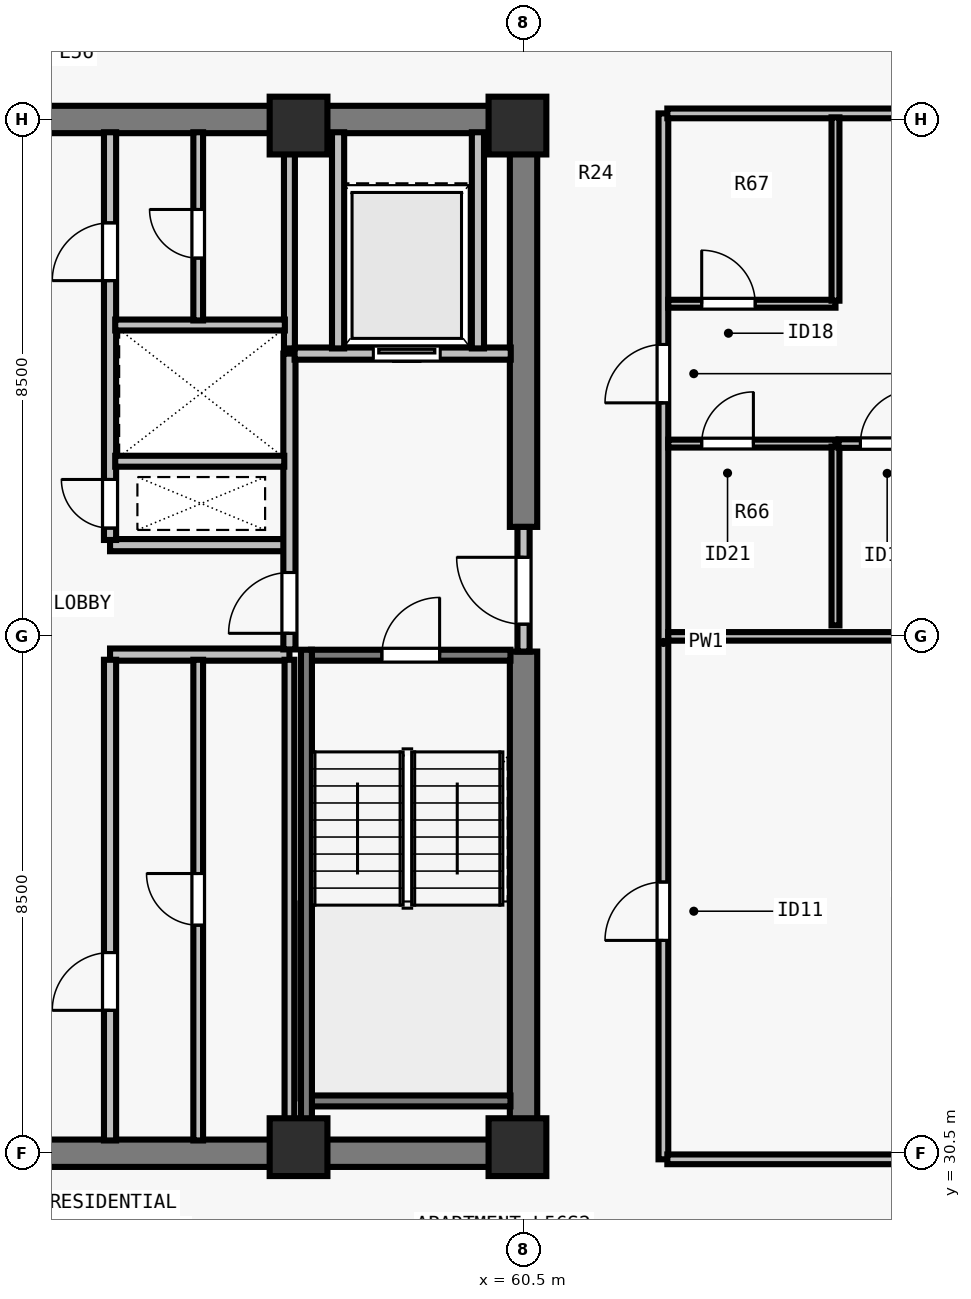
"""IFC4 building model, lengths in metres.
Left out: names, types, materials, properties, quantities, classifications, styles, units other than length and angle.
Written with IfcOpenShell. Run it as: python <this file> out.ifc"""

import sys

from ifc_helpers import new_model, si_unit, direction, frame, frame_2d, origin, origin_2d, place, context, subcontext, project, spatial, rectangle, extrude, element, fill, save


model = new_model("IFC4")
c1 = context("Model", 3, precision=1e-05, world=origin(), true_north=direction((0.0, 1.0)))
c2 = subcontext(c1, "Body", "Model", "MODEL_VIEW")
j1 = project(units=[si_unit("LENGTHUNIT", "METRE"), si_unit("PLANEANGLEUNIT", "RADIAN")], contexts=[c1])
p1 = place(None, origin())
s1 = spatial("IfcSite", under=j1, at=p1, CompositionType="ELEMENT")
p2 = place(p1, origin())
s2 = spatial("IfcBuilding", under=s1, at=p2, CompositionType="ELEMENT")
p3 = place(p2, frame((0.0, 0.0, 206.0)))
s3 = spatial("IfcBuildingStorey", under=s2, at=p3, CompositionType="ELEMENT", Elevation=206.0)
for number, where, z_axis, x_axis in (
    (1, (56.8, 30.6, 0.0), (0.0, 0.0, 1.0), (1.0, 0.0, 0.0)),
    (2, (60.4, 30.6, 0.0), (0.0, 0.0, 1.0), (1.0, 0.0, 0.0)),
    (3, (56.8, 47.4, 0.0), (0.0, 0.0, 1.0), (1.0, 0.0, 0.0)),
    (4, (60.4, 47.4, 0.0), (0.0, 0.0, 1.0), (1.0, 0.0, 0.0)),
):
    element("IfcColumn", number, at=place(p3, frame(where, z_axis=z_axis, x_axis=x_axis)), inside=s3, PredefinedType="COLUMN", context=c2, shape_type="SweptSolid", body=[
        extrude(rectangle(XDim=0.95, YDim=0.95, at=origin_2d()), origin(), (0.0, 0.0, 1.0), 3.5),
    ])
for number, where, z_axis, x_axis in (
    (5, (43.275, 30.5, 0.0), (0.0, 0.0, 1.0), (1.0, 0.0, 0.0)),
    (6, (43.275, 47.5, 0.0), (0.0, 0.0, 1.0), (1.0, 0.0, 0.0)),
):
    element("IfcWall", number, at=place(p3, frame(where, z_axis=z_axis, x_axis=x_axis)), inside=s3, PredefinedType="SHEAR", context=c2, shape_type="SweptSolid", body=[
        extrude(rectangle(XDim=17.45, YDim=0.45, at=frame_2d((8.725, 0.0))), origin(), (0.0, 0.0, 1.0), 3.29),
    ])
p4 = place(p3, frame((60.5, 30.715, 0.0), z_axis=(0.0, 0.0, 1.0), x_axis=(0.0, 1.0, 0.0)))
e7 = element("IfcWall", 7, at=p4, inside=s3, PredefinedType="SHEAR", context=c2, shape_type="SweptSolid", body=[
    extrude(rectangle(XDim=8.035, YDim=0.45, at=frame_2d((4.018, 0.0))), origin(), (0.0, 0.0, 1.0), 3.29),
])
p5 = place(p3, frame((60.5, 40.8, 0.0), z_axis=(0.0, 0.0, 1.0), x_axis=(0.0, 1.0, 0.0)))
e8 = element("IfcWall", 8, at=p5, inside=s3, PredefinedType="SHEAR", context=c2, shape_type="SweptSolid", body=[
    extrude(rectangle(XDim=6.485, YDim=0.45, at=frame_2d((3.242, 0.0))), origin(), (0.0, 0.0, 1.0), 3.29),
])
for number, where, z_axis, x_axis in (
    (9, (53.7, 38.7, 0.0), (0.0, 0.0, 1.0), (1.0, 0.0, 0.0)),
    (10, (53.7, 40.5, 0.0), (0.0, 0.0, 1.0), (1.0, 0.0, 0.0)),
):
    element("IfcWall", number, at=place(p3, frame(where, z_axis=z_axis, x_axis=x_axis)), inside=s3, PredefinedType="SOLIDWALL", context=c2, shape_type="SweptSolid", body=[
        extrude(rectangle(XDim=2.95, YDim=0.2, at=frame_2d((1.475, 0.0))), origin(), (0.0, 0.0, 1.0), 3.29),
    ])
p6 = place(p3, frame((53.7, 30.71, 0.0), z_axis=(0.0, 0.0, 1.0), x_axis=(0.0, 1.0, 0.0)))
e11 = element("IfcWall", 11, at=p6, inside=s3, PredefinedType="SOLIDWALL", context=c2, shape_type="SweptSolid", body=[
    extrude(rectangle(XDim=7.905, YDim=0.2, at=frame_2d((3.953, 0.0))), origin(), (0.0, 0.0, 1.0), 3.29),
])
p7 = place(p6, frame((2.14, 0.0, 0.0)))
e12 = element("IfcOpeningElement", 12, at=p7, cuts=e11, PredefinedType="OPENING", context=c2, shape_type="SweptSolid", body=[
    extrude(rectangle(XDim=0.95, YDim=2.12, at=frame_2d((0.475, 1.06))), frame((0.0, 0.11, 0.0), z_axis=(0.0, -1.0, 0.0), x_axis=(1.0, 0.0, 0.0)), (0.0, 0.0, 1.0), 0.22),
])
p8 = place(p3, frame((53.7, 40.585, 0.0), z_axis=(0.0, 0.0, 1.0), x_axis=(0.0, 1.0, 0.0)))
e13 = element("IfcWall", 13, at=p8, inside=s3, PredefinedType="SOLIDWALL", context=c2, shape_type="SweptSolid", body=[
    extrude(rectangle(XDim=6.705, YDim=0.2, at=frame_2d((3.353, 0.0))), origin(), (0.0, 0.0, 1.0), 3.29),
])
p9 = place(p8, frame((0.195, 0.0, 0.0)))
e14 = element("IfcOpeningElement", 14, at=p9, cuts=e13, PredefinedType="OPENING", context=c2, shape_type="SweptSolid", body=[
    extrude(rectangle(XDim=0.8, YDim=2.08, at=frame_2d((0.4, 1.04))), frame((0.0, 0.11, 0.0), z_axis=(0.0, -1.0, 0.0), x_axis=(1.0, 0.0, 0.0)), (0.0, 0.0, 1.0), 0.22),
])
p10 = place(p8, frame((4.265, 0.0, 0.0)))
e15 = element("IfcOpeningElement", 15, at=p10, cuts=e13, PredefinedType="OPENING", context=c2, shape_type="SweptSolid", body=[
    extrude(rectangle(XDim=0.95, YDim=2.12, at=frame_2d((0.475, 1.06))), frame((0.0, 0.11, 0.0), z_axis=(0.0, -1.0, 0.0), x_axis=(1.0, 0.0, 0.0)), (0.0, 0.0, 1.0), 0.22),
])
p11 = place(p3, frame((60.5, 38.75, 0.0), z_axis=(0.0, 0.0, 1.0), x_axis=(0.0, 1.0, 0.0)))
e16 = element("IfcWall", 16, at=p11, inside=s3, PredefinedType="SOLIDWALL", context=c2, shape_type="SweptSolid", body=[
    extrude(rectangle(XDim=2.05, YDim=0.2, at=frame_2d((1.025, 0.0))), origin(), (0.0, 0.0, 1.0), 3.29),
])
p12 = place(p11, frame((0.45, 0.0, 0.0)))
e17 = element("IfcOpeningElement", 17, at=p12, cuts=e16, PredefinedType="OPENING", context=c2, shape_type="SweptSolid", body=[
    extrude(rectangle(XDim=1.1, YDim=2.15, at=frame_2d((0.55, 1.075))), frame((0.0, 0.11, 0.0), z_axis=(0.0, -1.0, 0.0), x_axis=(1.0, 0.0, 0.0)), (0.0, 0.0, 1.0), 0.22),
])
p13 = place(p3, frame((56.65, 38.785, 0.0), z_axis=(0.0, 0.0, 1.0), x_axis=(0.0, 1.0, 0.0)))
e18 = element("IfcWall", 18, at=p13, inside=s3, PredefinedType="SOLIDWALL", context=c2, shape_type="SweptSolid", body=[
    extrude(rectangle(XDim=4.865, YDim=0.2, at=frame_2d((2.433, 0.0))), origin(), (0.0, 0.0, 1.0), 3.29),
])
p14 = place(p13, frame((0.265, 0.0, 0.0)))
e19 = element("IfcOpeningElement", 19, at=p14, cuts=e18, PredefinedType="OPENING", context=c2, shape_type="SweptSolid", body=[
    extrude(rectangle(XDim=1.0, YDim=2.15, at=frame_2d((0.5, 1.075))), frame((0.0, 0.11, 0.0), z_axis=(0.0, -1.0, 0.0), x_axis=(1.0, 0.0, 0.0)), (0.0, 0.0, 1.0), 0.22),
])
p15 = place(p3, frame((56.735, 43.65, 0.0), z_axis=(0.0, 0.0, 1.0), x_axis=(1.0, 0.0, 0.0)))
e20 = element("IfcWall", 20, at=p15, inside=s3, PredefinedType="SOLIDWALL", context=c2, shape_type="SweptSolid", body=[
    extrude(rectangle(XDim=3.555, YDim=0.2, at=frame_2d((1.777, 0.0))), origin(), (0.0, 0.0, 1.0), 3.29),
])
p16 = place(p15, frame((1.295, 0.0, 0.0)))
e21 = element("IfcOpeningElement", 21, at=p16, cuts=e20, PredefinedType="OPENING", context=c2, shape_type="SweptSolid", body=[
    extrude(rectangle(XDim=1.1, YDim=2.2, at=frame_2d((0.55, 1.1))), frame((0.0, 0.11, 0.0), z_axis=(0.0, -1.0, 0.0), x_axis=(1.0, 0.0, 0.0)), (0.0, 0.0, 1.0), 0.22),
])
for number, where, z_axis, x_axis in (
    (22, (57.45, 43.735, 0.0), (0.0, 0.0, 1.0), (0.0, 1.0, 0.0)),
    (23, (59.75, 43.735, 0.0), (0.0, 0.0, 1.0), (0.0, 1.0, 0.0)),
):
    element("IfcWall", number, at=place(p3, frame(where, z_axis=z_axis, x_axis=x_axis)), inside=s3, PredefinedType="SOLIDWALL", context=c2, shape_type="SweptSolid", body=[
        extrude(rectangle(XDim=3.555, YDim=0.2, at=frame_2d((1.777, 0.0))), origin(), (0.0, 0.0, 1.0), 3.29),
    ])
p17 = place(p3, frame((56.65, 30.71, 0.0), z_axis=(0.0, 0.0, 1.0), x_axis=(0.0, 1.0, 0.0)))
e24 = element("IfcWall", 24, at=p17, inside=s3, PredefinedType="PARTITIONING", context=c2, shape_type="SweptSolid", body=[
    extrude(rectangle(XDim=7.905, YDim=0.16, at=frame_2d((3.953, 0.0))), origin(), (0.0, 0.0, 1.0), 3.29),
])
p18 = place(p3, frame((55.15, 30.71, 0.0), z_axis=(0.0, 0.0, 1.0), x_axis=(0.0, 1.0, 0.0)))
e25 = element("IfcWall", 25, at=p18, inside=s3, PredefinedType="PARTITIONING", context=c2, shape_type="SweptSolid", body=[
    extrude(rectangle(XDim=7.905, YDim=0.16, at=frame_2d((3.953, 0.0))), origin(), (0.0, 0.0, 1.0), 3.29),
])
p19 = place(p18, frame((3.54, 0.0, 0.0)))
e26 = element("IfcOpeningElement", 26, at=p19, cuts=e25, PredefinedType="OPENING", context=c2, shape_type="SweptSolid", body=[
    extrude(rectangle(XDim=0.85, YDim=2.12, at=frame_2d((0.425, 1.06))), frame((0.0, 0.09, 0.0), z_axis=(0.0, -1.0, 0.0), x_axis=(1.0, 0.0, 0.0)), (0.0, 0.0, 1.0), 0.18),
])
p20 = place(p3, frame((56.65, 43.735, 0.0), z_axis=(0.0, 0.0, 1.0), x_axis=(0.0, 1.0, 0.0)))
e27 = element("IfcWall", 27, at=p20, inside=s3, PredefinedType="SOLIDWALL", context=c2, shape_type="SweptSolid", body=[
    extrude(rectangle(XDim=3.555, YDim=0.18, at=frame_2d((1.777, 0.0))), origin(), (0.0, 0.0, 1.0), 3.29),
])
p21 = place(p3, frame((53.785, 41.88, 0.0), z_axis=(0.0, 0.0, 1.0), x_axis=(1.0, 0.0, 0.0)))
e28 = element("IfcWall", 28, at=p21, inside=s3, PredefinedType="SOLIDWALL", context=c2, shape_type="SweptSolid", body=[
    extrude(rectangle(XDim=2.78, YDim=0.18, at=frame_2d((1.39, 0.0))), origin(), (0.0, 0.0, 1.0), 3.29),
])
p22 = place(p3, frame((53.785, 44.12, 0.0), z_axis=(0.0, 0.0, 1.0), x_axis=(1.0, 0.0, 0.0)))
e29 = element("IfcWall", 29, at=p22, inside=s3, PredefinedType="SOLIDWALL", context=c2, shape_type="SweptSolid", body=[
    extrude(rectangle(XDim=2.79, YDim=0.18, at=frame_2d((1.395, 0.0))), origin(), (0.0, 0.0, 1.0), 3.29),
])
p23 = place(p3, frame((55.15, 44.195, 0.0), z_axis=(0.0, 0.0, 1.0), x_axis=(0.0, 1.0, 0.0)))
e30 = element("IfcWall", 30, at=p23, inside=s3, PredefinedType="PARTITIONING", context=c2, shape_type="SweptSolid", body=[
    extrude(rectangle(XDim=3.095, YDim=0.16, at=frame_2d((1.547, 0.0))), origin(), (0.0, 0.0, 1.0), 3.29),
])
p24 = place(p23, frame((1.025, 0.0, 0.0)))
e31 = element("IfcOpeningElement", 31, at=p24, cuts=e30, PredefinedType="OPENING", context=c2, shape_type="SweptSolid", body=[
    extrude(rectangle(XDim=0.8, YDim=2.1, at=frame_2d((0.4, 1.05))), frame((0.0, 0.09, 0.0), z_axis=(0.0, -1.0, 0.0), x_axis=(1.0, 0.0, 0.0)), (0.0, 0.0, 1.0), 0.18),
])
p25 = place(p3, frame((62.8, 30.4, 0.0), z_axis=(0.0, 0.0, 1.0), x_axis=(0.0, 1.0, 0.0)))
e32 = element("IfcWall", 32, at=p25, inside=s3, PredefinedType="PARTITIONING", context=c2, shape_type="SweptSolid", body=[
    extrude(rectangle(XDim=17.2, YDim=0.16, at=frame_2d((8.6, 0.0))), origin(), (0.0, 0.0, 1.0), 3.29),
])
p26 = place(p25, frame((3.6, 0.0, 0.0)))
e33 = element("IfcOpeningElement", 33, at=p26, cuts=e32, PredefinedType="OPENING", context=c2, shape_type="SweptSolid", body=[
    extrude(rectangle(XDim=0.96, YDim=2.12, at=frame_2d((0.48, 1.06))), frame((0.0, 0.09, 0.0), z_axis=(0.0, -1.0, 0.0), x_axis=(1.0, 0.0, 0.0)), (0.0, 0.0, 1.0), 0.18),
])
p27 = place(p25, frame((12.44, 0.0, 0.0)))
e34 = element("IfcOpeningElement", 34, at=p27, cuts=e32, PredefinedType="OPENING", context=c2, shape_type="SweptSolid", body=[
    extrude(rectangle(XDim=0.96, YDim=2.18, at=frame_2d((0.48, 1.09))), frame((0.0, 0.09, 0.0), z_axis=(0.0, -1.0, 0.0), x_axis=(1.0, 0.0, 0.0)), (0.0, 0.0, 1.0), 0.18),
])
for number, where, z_axis, x_axis in (
    (35, (62.865, 30.4, 0.0), (0.0, 0.0, 1.0), (1.0, 0.0, 0.0)),
    (36, (62.865, 47.6, 0.0), (0.0, 0.0, 1.0), (1.0, 0.0, 0.0)),
):
    element("IfcWall", number, at=place(p3, frame(where, z_axis=z_axis, x_axis=x_axis)), inside=s3, PredefinedType="PARTITIONING", context=c2, shape_type="SweptSolid", body=[
        extrude(rectangle(XDim=11.33, YDim=0.16, at=frame_2d((5.665, 0.0))), origin(), (0.0, 0.0, 1.0), 3.29),
    ])
p28 = place(p3, frame((62.88, 39.0, 0.0), z_axis=(0.0, 0.0, 1.0), x_axis=(1.0, 0.0, 0.0)))
e37 = element("IfcWall", 37, at=p28, inside=s3, PredefinedType="PARTITIONING", context=c2, shape_type="SweptSolid", body=[
    extrude(rectangle(XDim=11.315, YDim=0.14, at=frame_2d((5.658, 0.0))), origin(), (0.0, 0.0, 1.0), 3.29),
])
p29 = place(p3, frame((62.88, 42.17, 0.0), z_axis=(0.0, 0.0, 1.0), x_axis=(1.0, 0.0, 0.0)))
e38 = element("IfcWall", 38, at=p29, inside=s3, PredefinedType="PLUMBINGWALL", context=c2, shape_type="SweptSolid", body=[
    extrude(rectangle(XDim=2.75, YDim=0.13, at=frame_2d((1.375, 0.0))), origin(), (0.0, 0.0, 1.0), 3.29),
])
p30 = place(p29, frame((0.55, 0.0, 0.0)))
e39 = element("IfcOpeningElement", 39, at=p30, cuts=e38, PredefinedType="OPENING", context=c2, shape_type="SweptSolid", body=[
    extrude(rectangle(XDim=0.85, YDim=2.08, at=frame_2d((0.425, 1.04))), frame((0.0, 0.075, 0.0), z_axis=(0.0, -1.0, 0.0), x_axis=(1.0, 0.0, 0.0)), (0.0, 0.0, 1.0), 0.15),
])
p31 = place(p3, frame((65.63, 39.18, 0.0), z_axis=(0.0, 0.0, 1.0), x_axis=(0.0, 1.0, 0.0)))
e40 = element("IfcWall", 40, at=p31, inside=s3, PredefinedType="PLUMBINGWALL", context=c2, shape_type="SweptSolid", body=[
    extrude(rectangle(XDim=2.94, YDim=0.13, at=frame_2d((1.47, 0.0))), origin(), (0.0, 0.0, 1.0), 3.29),
])
p32 = place(p3, frame((62.88, 44.47, 0.0), z_axis=(0.0, 0.0, 1.0), x_axis=(1.0, 0.0, 0.0)))
e41 = element("IfcWall", 41, at=p32, inside=s3, PredefinedType="PLUMBINGWALL", context=c2, shape_type="SweptSolid", body=[
    extrude(rectangle(XDim=2.75, YDim=0.13, at=frame_2d((1.375, 0.0))), origin(), (0.0, 0.0, 1.0), 3.29),
])
p33 = place(p32, frame((0.55, 0.0, 0.0)))
e42 = element("IfcOpeningElement", 42, at=p33, cuts=e41, PredefinedType="OPENING", context=c2, shape_type="SweptSolid", body=[
    extrude(rectangle(XDim=0.88, YDim=2.1, at=frame_2d((0.44, 1.05))), frame((0.0, 0.075, 0.0), z_axis=(0.0, -1.0, 0.0), x_axis=(1.0, 0.0, 0.0)), (0.0, 0.0, 1.0), 0.15),
])
p34 = place(p3, frame((65.63, 44.52, 0.0), z_axis=(0.0, 0.0, 1.0), x_axis=(0.0, 1.0, 0.0)))
e43 = element("IfcWall", 43, at=p34, inside=s3, PredefinedType="PLUMBINGWALL", context=c2, shape_type="SweptSolid", body=[
    extrude(rectangle(XDim=3.015, YDim=0.13, at=frame_2d((1.507, 0.0))), origin(), (0.0, 0.0, 1.0), 3.29),
])
p35 = place(p3, frame((65.68, 42.17, 0.0), z_axis=(0.0, 0.0, 1.0), x_axis=(1.0, 0.0, 0.0)))
e44 = element("IfcWall", 44, at=p35, inside=s3, PredefinedType="PARTITIONING", context=c2, shape_type="SweptSolid", body=[
    extrude(rectangle(XDim=8.44, YDim=0.14, at=frame_2d((4.22, 0.0))), origin(), (0.0, 0.0, 1.0), 3.29),
])
p36 = place(p35, frame((0.36, 0.0, 0.0)))
e45 = element("IfcOpeningElement", 45, at=p36, cuts=e44, PredefinedType="OPENING", context=c2, shape_type="SweptSolid", body=[
    extrude(rectangle(XDim=0.88, YDim=2.1, at=frame_2d((0.44, 1.05))), frame((0.0, 0.08, 0.0), z_axis=(0.0, -1.0, 0.0), x_axis=(1.0, 0.0, 0.0)), (0.0, 0.0, 1.0), 0.16),
])
p37 = place(p3, frame((57.005, 38.69, 0.0), z_axis=(0.0, 0.0, 1.0), x_axis=(1.0, 0.0, 0.0)))
e46 = element("IfcWall", 46, at=p37, inside=s3, PredefinedType="SOLIDWALL", context=c2, shape_type="SweptSolid", body=[
    extrude(rectangle(XDim=3.28, YDim=0.18, at=frame_2d((1.64, 0.0))), origin(), (0.0, 0.0, 1.0), 3.29),
])
p38 = place(p37, frame((1.165, 0.0, 0.0)))
e47 = element("IfcOpeningElement", 47, at=p38, cuts=e46, PredefinedType="OPENING", context=c2, shape_type="SweptSolid", body=[
    extrude(rectangle(XDim=0.95, YDim=2.15, at=frame_2d((0.475, 1.075))), frame((0.0, 0.1, 0.0), z_axis=(0.0, -1.0, 0.0), x_axis=(1.0, 0.0, 0.0)), (0.0, 0.0, 1.0), 0.2),
])
p39 = place(p3, frame((57.005, 31.36, 0.0), z_axis=(0.0, 0.0, 1.0), x_axis=(1.0, 0.0, 0.0)))
e48 = element("IfcWall", 48, at=p39, inside=s3, PredefinedType="SOLIDWALL", context=c2, shape_type="SweptSolid", body=[
    extrude(rectangle(XDim=3.28, YDim=0.18, at=frame_2d((1.64, 0.0))), origin(), (0.0, 0.0, 1.0), 3.29),
])
p40 = place(p3, frame((56.93, 38.78, 0.0), z_axis=(0.0, 0.0, 1.0), x_axis=(0.0, -1.0, 0.0)))
e49 = element("IfcWall", 49, at=p40, inside=s3, PredefinedType="SOLIDWALL", context=c2, shape_type="SweptSolid", body=[
    extrude(rectangle(XDim=8.067, YDim=0.18, at=frame_2d((4.034, 0.0))), origin(), (0.0, 0.0, 1.0), 3.29),
])
p41 = place(p12, origin())
e50 = element("IfcDoor", 50, at=p41, inside=s3, OperationType="SINGLE_SWING_RIGHT", PredefinedType="DOOR", context=c2, shape_type="SweptSolid", body=[
    extrude(rectangle(XDim=1.1, YDim=2.15, at=frame_2d((0.55, 1.075))), frame((0.0, 0.025, 0.0), z_axis=(0.0, -1.0, 0.0), x_axis=(1.0, 0.0, 0.0)), (0.0, 0.0, 1.0), 0.05),
])
fill(e17, e50)
p42 = place(p14, origin())
e51 = element("IfcDoor", 51, at=p42, inside=s3, OperationType="SINGLE_SWING_LEFT", PredefinedType="DOOR", context=c2, shape_type="SweptSolid", body=[
    extrude(rectangle(XDim=1.0, YDim=2.15, at=frame_2d((0.5, 1.075))), frame((0.0, 0.025, 0.0), z_axis=(0.0, -1.0, 0.0), x_axis=(1.0, 0.0, 0.0)), (0.0, 0.0, 1.0), 0.05),
])
fill(e19, e51)
p43 = place(p16, origin())
e52 = element("IfcDoor", 52, at=p43, inside=s3, OperationType="SLIDING_TO_LEFT", PredefinedType="DOOR", context=c2, shape_type="SweptSolid", body=[
    extrude(rectangle(XDim=1.1, YDim=2.2, at=frame_2d((0.55, 1.1))), frame((0.0, 0.025, 0.0), z_axis=(0.0, -1.0, 0.0), x_axis=(1.0, 0.0, 0.0)), (0.0, 0.0, 1.0), 0.05),
])
fill(e21, e52)
p44 = place(p7, origin())
e53 = element("IfcDoor", 53, at=p44, inside=s3, OperationType="SINGLE_SWING_LEFT", PredefinedType="DOOR", context=c2, shape_type="SweptSolid", body=[
    extrude(rectangle(XDim=0.95, YDim=2.12, at=frame_2d((0.475, 1.06))), frame((0.0, 0.025, 0.0), z_axis=(0.0, -1.0, 0.0), x_axis=(1.0, 0.0, 0.0)), (0.0, 0.0, 1.0), 0.05),
])
fill(e12, e53)
p45 = place(p19, origin())
e54 = element("IfcDoor", 54, at=p45, inside=s3, OperationType="SINGLE_SWING_RIGHT", PredefinedType="DOOR", context=c2, shape_type="SweptSolid", body=[
    extrude(rectangle(XDim=0.85, YDim=2.12, at=frame_2d((0.425, 1.06))), frame((0.0, 0.025, 0.0), z_axis=(0.0, -1.0, 0.0), x_axis=(1.0, 0.0, 0.0)), (0.0, 0.0, 1.0), 0.05),
])
fill(e26, e54)
p46 = place(p9, origin())
e55 = element("IfcDoor", 55, at=p46, inside=s3, OperationType="SINGLE_SWING_RIGHT", PredefinedType="DOOR", context=c2, shape_type="SweptSolid", body=[
    extrude(rectangle(XDim=0.8, YDim=2.08, at=frame_2d((0.4, 1.04))), frame((0.0, 0.025, 0.0), z_axis=(0.0, -1.0, 0.0), x_axis=(1.0, 0.0, 0.0)), (0.0, 0.0, 1.0), 0.05),
])
fill(e14, e55)
p47 = place(p10, origin())
e56 = element("IfcDoor", 56, at=p47, inside=s3, OperationType="SINGLE_SWING_LEFT", PredefinedType="DOOR", context=c2, shape_type="SweptSolid", body=[
    extrude(rectangle(XDim=0.95, YDim=2.12, at=frame_2d((0.475, 1.06))), frame((0.0, 0.025, 0.0), z_axis=(0.0, -1.0, 0.0), x_axis=(1.0, 0.0, 0.0)), (0.0, 0.0, 1.0), 0.05),
])
fill(e15, e56)
p48 = place(p24, origin())
e57 = element("IfcDoor", 57, at=p48, inside=s3, OperationType="SINGLE_SWING_RIGHT", PredefinedType="DOOR", context=c2, shape_type="SweptSolid", body=[
    extrude(rectangle(XDim=0.8, YDim=2.1, at=frame_2d((0.4, 1.05))), frame((0.0, 0.025, 0.0), z_axis=(0.0, -1.0, 0.0), x_axis=(1.0, 0.0, 0.0)), (0.0, 0.0, 1.0), 0.05),
])
fill(e31, e57)
p49 = place(p26, origin())
e58 = element("IfcDoor", 58, at=p49, inside=s3, OperationType="SINGLE_SWING_LEFT", PredefinedType="DOOR", context=c2, shape_type="SweptSolid", body=[
    extrude(rectangle(XDim=0.96, YDim=2.12, at=frame_2d((0.48, 1.06))), frame((0.0, 0.025, 0.0), z_axis=(0.0, -1.0, 0.0), x_axis=(1.0, 0.0, 0.0)), (0.0, 0.0, 1.0), 0.05),
])
fill(e33, e58)
p50 = place(p30, origin())
e59 = element("IfcDoor", 59, at=p50, inside=s3, OperationType="SINGLE_SWING_RIGHT", PredefinedType="DOOR", context=c2, shape_type="SweptSolid", body=[
    extrude(rectangle(XDim=0.85, YDim=2.08, at=frame_2d((0.425, 1.04))), frame((0.0, 0.025, 0.0), z_axis=(0.0, -1.0, 0.0), x_axis=(1.0, 0.0, 0.0)), (0.0, 0.0, 1.0), 0.05),
])
fill(e39, e59)
p51 = place(p33, origin())
e60 = element("IfcDoor", 60, at=p51, inside=s3, OperationType="SINGLE_SWING_LEFT", PredefinedType="DOOR", context=c2, shape_type="SweptSolid", body=[
    extrude(rectangle(XDim=0.88, YDim=2.1, at=frame_2d((0.44, 1.05))), frame((0.0, 0.025, 0.0), z_axis=(0.0, -1.0, 0.0), x_axis=(1.0, 0.0, 0.0)), (0.0, 0.0, 1.0), 0.05),
])
fill(e42, e60)
p52 = place(p36, origin())
e61 = element("IfcDoor", 61, at=p52, inside=s3, OperationType="SINGLE_SWING_RIGHT", PredefinedType="DOOR", context=c2, shape_type="SweptSolid", body=[
    extrude(rectangle(XDim=0.88, YDim=2.1, at=frame_2d((0.44, 1.05))), frame((0.0, 0.025, 0.0), z_axis=(0.0, -1.0, 0.0), x_axis=(1.0, 0.0, 0.0)), (0.0, 0.0, 1.0), 0.05),
])
fill(e45, e61)
p53 = place(p27, origin())
e62 = element("IfcDoor", 62, at=p53, inside=s3, OperationType="SINGLE_SWING_LEFT", PredefinedType="DOOR", context=c2, shape_type="SweptSolid", body=[
    extrude(rectangle(XDim=0.96, YDim=2.18, at=frame_2d((0.48, 1.09))), frame((0.0, 0.025, 0.0), z_axis=(0.0, -1.0, 0.0), x_axis=(1.0, 0.0, 0.0)), (0.0, 0.0, 1.0), 0.05),
])
fill(e34, e62)
p54 = place(p38, origin())
e63 = element("IfcDoor", 63, at=p54, inside=s3, OperationType="SINGLE_SWING_RIGHT", PredefinedType="DOOR", context=c2, shape_type="SweptSolid", body=[
    extrude(rectangle(XDim=0.95, YDim=2.15, at=frame_2d((0.475, 1.075))), frame((0.0, 0.025, 0.0), z_axis=(0.0, -1.0, 0.0), x_axis=(1.0, 0.0, 0.0)), (0.0, 0.0, 1.0), 0.05),
])
fill(e47, e63)
save(model, sys.argv[1])
